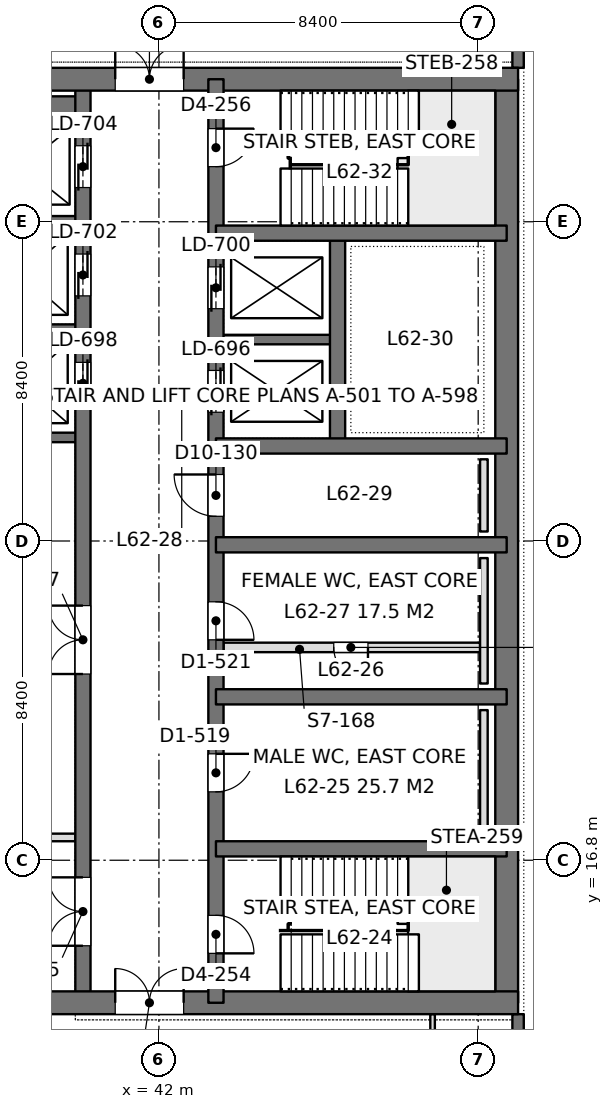
"""IFC4 building model, lengths in metres.
Left out: names, types, materials, properties, quantities, classifications, styles, units other than length and angle.
Written with IfcOpenShell. Run it as: python <this file> out.ifc"""

import sys

from ifc_helpers import new_model, si_unit, direction, frame, frame_2d, origin, place, context, subcontext, project, spatial, rectangle, extrude, element, fill, save


model = new_model("IFC4")
c1 = context("Model", 3, precision=1e-05, world=origin(), true_north=direction((0.0, 1.0)))
c2 = subcontext(c1, "Body", "Model", "MODEL_VIEW")
j1 = project(units=[si_unit("LENGTHUNIT", "METRE"), si_unit("PLANEANGLEUNIT", "RADIAN")], contexts=[c1])
p1 = place(None, origin())
s1 = spatial("IfcSite", under=j1, at=p1, CompositionType="ELEMENT")
p2 = place(p1, origin())
s2 = spatial("IfcBuilding", under=s1, at=p2, CompositionType="ELEMENT")
p3 = place(p2, frame((0.0, 0.0, 272.7)))
s3 = spatial("IfcBuildingStorey", under=s2, at=p3, CompositionType="ELEMENT", Elevation=272.7)
p4 = place(p3, frame((33.75, 13.05, 0.0), z_axis=(0.0, 0.0, 1.0), x_axis=(1.0, 0.0, 0.0)))
e1 = element("IfcWall", 1, at=p4, inside=s3, PredefinedType="SHEAR", context=c2, shape_type="SweptSolid", body=[
    extrude(rectangle(XDim=17.7, YDim=0.6, at=frame_2d((8.85, 0.0))), origin(), (0.0, 0.0, 1.0), 4.5),
])
p5 = place(p4, frame((7.1, 0.0, 0.0)))
e2 = element("IfcOpeningElement", 2, at=p5, cuts=e1, PredefinedType="OPENING", context=c2, shape_type="SweptSolid", body=[
    extrude(rectangle(XDim=1.8, YDim=2.4, at=frame_2d((0.9, 1.2))), frame((0.0, 0.31, 0.0), z_axis=(0.0, -1.0, 0.0), x_axis=(1.0, 0.0, 0.0)), (0.0, 0.0, 1.0), 0.62),
])
p6 = place(p3, frame((33.75, 37.35, 0.0), z_axis=(0.0, 0.0, 1.0), x_axis=(1.0, 0.0, 0.0)))
e3 = element("IfcWall", 3, at=p6, inside=s3, PredefinedType="SHEAR", context=c2, shape_type="SweptSolid", body=[
    extrude(rectangle(XDim=17.7, YDim=0.6, at=frame_2d((8.85, 0.0))), origin(), (0.0, 0.0, 1.0), 4.5),
])
p7 = place(p6, frame((7.1, 0.0, 0.0)))
e4 = element("IfcOpeningElement", 4, at=p7, cuts=e3, PredefinedType="OPENING", context=c2, shape_type="SweptSolid", body=[
    extrude(rectangle(XDim=1.8, YDim=2.4, at=frame_2d((0.9, 1.2))), frame((0.0, 0.31, 0.0), z_axis=(0.0, -1.0, 0.0), x_axis=(1.0, 0.0, 0.0)), (0.0, 0.0, 1.0), 0.62),
])
p8 = place(p3, frame((51.15, 13.05, 0.0), z_axis=(0.0, 0.0, 1.0), x_axis=(0.0, 1.0, 0.0)))
e5 = element("IfcWall", 5, at=p8, inside=s3, PredefinedType="SHEAR", context=c2, shape_type="SweptSolid", body=[
    extrude(rectangle(XDim=24.3, YDim=0.6, at=frame_2d((12.15, 0.0))), origin(), (0.0, 0.0, 1.0), 4.5),
])
p9 = place(p3, frame((43.5, 13.05, 0.0), z_axis=(0.0, 0.0, 1.0), x_axis=(0.0, 1.0, 0.0)))
e6 = element("IfcWall", 6, at=p9, inside=s3, PredefinedType="SHEAR", context=c2, shape_type="SweptSolid", body=[
    extrude(rectangle(XDim=24.3, YDim=0.4, at=frame_2d((12.15, 0.0))), origin(), (0.0, 0.0, 1.0), 4.5),
])
p10 = place(p9, frame((1.3, 0.0, 0.0)))
e7 = element("IfcOpeningElement", 7, at=p10, cuts=e6, PredefinedType="OPENING", context=c2, shape_type="SweptSolid", body=[
    extrude(rectangle(XDim=1.0, YDim=2.2, at=frame_2d((0.5, 1.1))), frame((0.0, 0.21, 0.0), z_axis=(0.0, -1.0, 0.0), x_axis=(1.0, 0.0, 0.0)), (0.0, 0.0, 1.0), 0.42),
])
p11 = place(p9, frame((22.0, 0.0, 0.0)))
e8 = element("IfcOpeningElement", 8, at=p11, cuts=e6, PredefinedType="OPENING", context=c2, shape_type="SweptSolid", body=[
    extrude(rectangle(XDim=1.0, YDim=2.2, at=frame_2d((0.5, 1.1))), frame((0.0, 0.21, 0.0), z_axis=(0.0, -1.0, 0.0), x_axis=(1.0, 0.0, 0.0)), (0.0, 0.0, 1.0), 0.42),
])
p12 = place(p9, frame((5.55, 0.0, 0.0)))
e9 = element("IfcOpeningElement", 9, at=p12, cuts=e6, PredefinedType="OPENING", context=c2, shape_type="SweptSolid", body=[
    extrude(rectangle(XDim=1.0, YDim=2.2, at=frame_2d((0.5, 1.1))), frame((0.0, 0.21, 0.0), z_axis=(0.0, -1.0, 0.0), x_axis=(1.0, 0.0, 0.0)), (0.0, 0.0, 1.0), 0.42),
])
p13 = place(p9, frame((9.55, 0.0, 0.0)))
e10 = element("IfcOpeningElement", 10, at=p13, cuts=e6, PredefinedType="OPENING", context=c2, shape_type="SweptSolid", body=[
    extrude(rectangle(XDim=1.0, YDim=2.2, at=frame_2d((0.5, 1.1))), frame((0.0, 0.21, 0.0), z_axis=(0.0, -1.0, 0.0), x_axis=(1.0, 0.0, 0.0)), (0.0, 0.0, 1.0), 0.42),
])
p14 = place(p9, frame((12.8, 0.0, 0.0)))
e11 = element("IfcOpeningElement", 11, at=p14, cuts=e6, PredefinedType="OPENING", context=c2, shape_type="SweptSolid", body=[
    extrude(rectangle(XDim=1.1, YDim=2.2, at=frame_2d((0.55, 1.1))), frame((0.0, 0.21, 0.0), z_axis=(0.0, -1.0, 0.0), x_axis=(1.0, 0.0, 0.0)), (0.0, 0.0, 1.0), 0.42),
])
p15 = place(p9, frame((15.538, 0.0, 0.0)))
e12 = element("IfcOpeningElement", 12, at=p15, cuts=e6, PredefinedType="OPENING", context=c2, shape_type="SweptSolid", body=[
    extrude(rectangle(XDim=1.1, YDim=2.2, at=frame_2d((0.55, 1.1))), frame((0.0, 0.21, 0.0), z_axis=(0.0, -1.0, 0.0), x_axis=(1.0, 0.0, 0.0)), (0.0, 0.0, 1.0), 0.42),
])
p16 = place(p9, frame((18.262, 0.0, 0.0)))
e13 = element("IfcOpeningElement", 13, at=p16, cuts=e6, PredefinedType="OPENING", context=c2, shape_type="SweptSolid", body=[
    extrude(rectangle(XDim=1.1, YDim=2.2, at=frame_2d((0.55, 1.1))), frame((0.0, 0.21, 0.0), z_axis=(0.0, -1.0, 0.0), x_axis=(1.0, 0.0, 0.0)), (0.0, 0.0, 1.0), 0.42),
])
p17 = place(p3, frame((40.0, 13.05, 0.0), z_axis=(0.0, 0.0, 1.0), x_axis=(0.0, 1.0, 0.0)))
e14 = element("IfcWall", 14, at=p17, inside=s3, PredefinedType="SHEAR", context=c2, shape_type="SweptSolid", body=[
    extrude(rectangle(XDim=24.3, YDim=0.4, at=frame_2d((12.15, 0.0))), origin(), (0.0, 0.0, 1.0), 4.5),
])
p18 = place(p17, frame((15.75, 0.0, 0.0)))
e15 = element("IfcOpeningElement", 15, at=p18, cuts=e14, PredefinedType="OPENING", context=c2, shape_type="SweptSolid", body=[
    extrude(rectangle(XDim=1.1, YDim=2.2, at=frame_2d((0.55, 1.1))), frame((0.0, 0.21, 0.0), z_axis=(0.0, -1.0, 0.0), x_axis=(1.0, 0.0, 0.0)), (0.0, 0.0, 1.0), 0.42),
])
p19 = place(p17, frame((18.6, 0.0, 0.0)))
e16 = element("IfcOpeningElement", 16, at=p19, cuts=e14, PredefinedType="OPENING", context=c2, shape_type="SweptSolid", body=[
    extrude(rectangle(XDim=1.1, YDim=2.2, at=frame_2d((0.55, 1.1))), frame((0.0, 0.21, 0.0), z_axis=(0.0, -1.0, 0.0), x_axis=(1.0, 0.0, 0.0)), (0.0, 0.0, 1.0), 0.42),
])
p20 = place(p17, frame((21.45, 0.0, 0.0)))
e17 = element("IfcOpeningElement", 17, at=p20, cuts=e14, PredefinedType="OPENING", context=c2, shape_type="SweptSolid", body=[
    extrude(rectangle(XDim=1.1, YDim=2.2, at=frame_2d((0.55, 1.1))), frame((0.0, 0.21, 0.0), z_axis=(0.0, -1.0, 0.0), x_axis=(1.0, 0.0, 0.0)), (0.0, 0.0, 1.0), 0.42),
])
p21 = place(p17, frame((8.65, 0.0, 0.0)))
e18 = element("IfcOpeningElement", 18, at=p21, cuts=e14, PredefinedType="OPENING", context=c2, shape_type="SweptSolid", body=[
    extrude(rectangle(XDim=1.8, YDim=2.4, at=frame_2d((0.9, 1.2))), frame((0.0, 0.21, 0.0), z_axis=(0.0, -1.0, 0.0), x_axis=(1.0, 0.0, 0.0)), (0.0, 0.0, 1.0), 0.42),
])
p22 = place(p17, frame((1.5, 0.0, 0.0)))
e19 = element("IfcOpeningElement", 19, at=p22, cuts=e14, PredefinedType="OPENING", context=c2, shape_type="SweptSolid", body=[
    extrude(rectangle(XDim=1.8, YDim=2.4, at=frame_2d((0.9, 1.2))), frame((0.0, 0.21, 0.0), z_axis=(0.0, -1.0, 0.0), x_axis=(1.0, 0.0, 0.0)), (0.0, 0.0, 1.0), 0.42),
])
for number, where, z_axis, x_axis in (
    (20, (51.15, 17.1, 0.0), (0.0, 0.0, 1.0), (-1.0, 0.0, 0.0)),
    (21, (51.15, 21.1, 0.0), (0.0, 0.0, 1.0), (-1.0, 0.0, 0.0)),
    (22, (51.15, 25.1, 0.0), (0.0, 0.0, 1.0), (-1.0, 0.0, 0.0)),
    (23, (51.15, 27.7, 0.0), (0.0, 0.0, 1.0), (-1.0, 0.0, 0.0)),
    (24, (51.15, 33.3, 0.0), (0.0, 0.0, 1.0), (-1.0, 0.0, 0.0)),
):
    element("IfcWall", number, at=place(p3, frame(where, z_axis=z_axis, x_axis=x_axis)), inside=s3, PredefinedType="SHEAR", context=c2, shape_type="SweptSolid", body=[
        extrude(rectangle(XDim=7.65, YDim=0.4, at=frame_2d((3.825, 0.0))), origin(), (0.0, 0.0, 1.0), 4.5),
    ])
p23 = place(p3, frame((46.7, 27.7, 0.0), z_axis=(0.0, 0.0, 1.0), x_axis=(0.0, 1.0, 0.0)))
e25 = element("IfcWall", 25, at=p23, inside=s3, PredefinedType="SHEAR", context=c2, shape_type="SweptSolid", body=[
    extrude(rectangle(XDim=5.6, YDim=0.4, at=frame_2d((2.8, 0.0))), origin(), (0.0, 0.0, 1.0), 4.5),
])
p24 = place(p3, frame((46.7, 30.5, 0.0), z_axis=(0.0, 0.0, 1.0), x_axis=(-1.0, 0.0, 0.0)))
e26 = element("IfcWall", 26, at=p24, inside=s3, PredefinedType="SHEAR", context=c2, shape_type="SweptSolid", body=[
    extrude(rectangle(XDim=3.2, YDim=0.25, at=frame_2d((1.6, 0.0))), origin(), (0.0, 0.0, 1.0), 4.5),
])
p25 = place(p3, frame((40.0, 27.925, 0.0), z_axis=(0.0, 0.0, 1.0), x_axis=(-1.0, 0.0, 0.0)))
e27 = element("IfcWall", 27, at=p25, inside=s3, PredefinedType="SHEAR", context=c2, shape_type="SweptSolid", body=[
    extrude(rectangle(XDim=5.95, YDim=0.25, at=frame_2d((2.975, 0.0))), origin(), (0.0, 0.0, 1.0), 4.5),
])
for number, where, z_axis, x_axis in (
    (28, (40.0, 30.775, 0.0), (0.0, 0.0, 1.0), (-1.0, 0.0, 0.0)),
    (29, (40.0, 33.625, 0.0), (0.0, 0.0, 1.0), (-1.0, 0.0, 0.0)),
):
    element("IfcWall", number, at=place(p3, frame(where, z_axis=z_axis, x_axis=x_axis)), inside=s3, PredefinedType="SHEAR", context=c2, shape_type="SweptSolid", body=[
        extrude(rectangle(XDim=3.2, YDim=0.25, at=frame_2d((1.6, 0.0))), origin(), (0.0, 0.0, 1.0), 4.5),
    ])
p26 = place(p3, frame((40.0, 36.625, 0.0), z_axis=(0.0, 0.0, 1.0), x_axis=(-1.0, 0.0, 0.0)))
e30 = element("IfcWall", 30, at=p26, inside=s3, PredefinedType="SHEAR", context=c2, shape_type="SweptSolid", body=[
    extrude(rectangle(XDim=3.2, YDim=0.55, at=frame_2d((1.6, 0.0))), origin(), (0.0, 0.0, 1.0), 4.5),
])
p27 = place(p3, frame((51.45, 42.0, 0.0), z_axis=(0.0, 0.0, 1.0), x_axis=(0.0, -1.0, 0.0)))
e31 = element("IfcWall", 31, at=p27, inside=s3, PredefinedType="SOLIDWALL", context=c2, shape_type="SweptSolid", body=[
    extrude(rectangle(XDim=4.35, YDim=0.3, at=frame_2d((2.175, 0.0))), origin(), (0.0, 0.0, 1.0), 4.35),
])
p28 = place(p27, frame((0.975, 0.0, 0.9)))
e32 = element("IfcOpeningElement", 32, at=p28, cuts=e31, PredefinedType="OPENING", context=c2, shape_type="SweptSolid", body=[
    extrude(rectangle(XDim=2.4, YDim=1.9, at=frame_2d((1.2, 0.95))), frame((0.0, 0.16, 0.0), z_axis=(0.0, -1.0, 0.0), x_axis=(1.0, 0.0, 0.0)), (0.0, 0.0, 1.0), 0.32),
])
p29 = place(p3, frame((51.45, 12.75, 0.0), z_axis=(0.0, 0.0, 1.0), x_axis=(0.0, -1.0, 0.0)))
e33 = element("IfcWall", 33, at=p29, inside=s3, PredefinedType="SOLIDWALL", context=c2, shape_type="SweptSolid", body=[
    extrude(rectangle(XDim=4.35, YDim=0.3, at=frame_2d((2.175, 0.0))), origin(), (0.0, 0.0, 1.0), 4.35),
])
p30 = place(p29, frame((0.975, 0.0, 0.9)))
e34 = element("IfcOpeningElement", 34, at=p30, cuts=e33, PredefinedType="OPENING", context=c2, shape_type="SweptSolid", body=[
    extrude(rectangle(XDim=2.4, YDim=1.9, at=frame_2d((1.2, 0.95))), frame((0.0, 0.16, 0.0), z_axis=(0.0, -1.0, 0.0), x_axis=(1.0, 0.0, 0.0)), (0.0, 0.0, 1.0), 0.32),
])
p31 = place(p3, frame((33.898, 17.4, 0.0), z_axis=(0.0, 0.0, 1.0), x_axis=(1.0, 0.0, 0.0)))
e35 = element("IfcWall", 35, at=p31, inside=s3, PredefinedType="PARTITIONING", context=c2, shape_type="SweptSolid", body=[
    extrude(rectangle(XDim=5.904, YDim=0.2, at=frame_2d((2.952, 0.0))), origin(), (0.0, 0.0, 1.0), 3.8),
])
for number, where, z_axis, x_axis in (
    (36, (49.2, 10.4, 0.0), (0.0, 0.0, 1.0), (0.0, 1.0, 0.0)),
    (37, (49.2, 37.648, 0.0), (0.0, 0.0, 1.0), (0.0, 1.0, 0.0)),
):
    element("IfcWall", number, at=place(p3, frame(where, z_axis=z_axis, x_axis=x_axis)), inside=s3, PredefinedType="PARTITIONING", context=c2, shape_type="SweptSolid", body=[
        extrude(rectangle(XDim=2.352, YDim=0.12, at=frame_2d((1.176, 0.0))), origin(), (0.0, 0.0, 1.0), 4.35),
    ])
p32 = place(p3, frame((43.7, 22.4, 0.0), z_axis=(0.0, 0.0, 1.0), x_axis=(1.0, 0.0, 0.0)))
e38 = element("IfcWall", 38, at=p32, inside=s3, PredefinedType="PARTITIONING", context=c2, shape_type="SweptSolid", body=[
    extrude(rectangle(XDim=6.75, YDim=0.25, at=frame_2d((3.375, 0.0))), origin(), (0.0, 0.0, 1.0), 4.3),
])
p33 = place(p32, frame((2.9, 0.0, 0.0)))
e39 = element("IfcOpeningElement", 39, at=p33, cuts=e38, PredefinedType="OPENING", context=c2, shape_type="SweptSolid", body=[
    extrude(rectangle(XDim=0.9, YDim=2.2, at=frame_2d((0.45, 1.1))), frame((0.0, 0.135, 0.0), z_axis=(0.0, -1.0, 0.0), x_axis=(1.0, 0.0, 0.0)), (0.0, 0.0, 1.0), 0.27),
])
for number, where, z_axis, x_axis in (
    (40, (50.55, 17.45, 0.0), (0.0, 0.0, 1.0), (0.0, 1.0, 0.0)),
    (41, (50.55, 21.45, 0.0), (0.0, 0.0, 1.0), (0.0, 1.0, 0.0)),
):
    element("IfcWall", number, at=place(p3, frame(where, z_axis=z_axis, x_axis=x_axis)), inside=s3, PredefinedType="PLUMBINGWALL", context=c2, shape_type="SweptSolid", body=[
        extrude(rectangle(XDim=3.3, YDim=0.2, at=frame_2d((1.65, 0.0))), origin(), (0.0, 0.0, 1.0), 1.2),
    ])
p34 = place(p3, frame((50.55, 25.45, 0.0), z_axis=(0.0, 0.0, 1.0), x_axis=(0.0, 1.0, 0.0)))
e42 = element("IfcWall", 42, at=p34, inside=s3, PredefinedType="PLUMBINGWALL", context=c2, shape_type="SweptSolid", body=[
    extrude(rectangle(XDim=1.9, YDim=0.2, at=frame_2d((0.95, 0.0))), origin(), (0.0, 0.0, 1.0), 1.2),
])
p35 = place(p5, origin())
e43 = element("IfcDoor", 43, at=p35, inside=s3, OperationType="DOUBLE_DOOR_SINGLE_SWING", PredefinedType="DOOR", context=c2, shape_type="SweptSolid", body=[
    extrude(rectangle(XDim=1.8, YDim=2.4, at=frame_2d((0.9, 1.2))), frame((0.0, 0.025, 0.0), z_axis=(0.0, -1.0, 0.0), x_axis=(1.0, 0.0, 0.0)), (0.0, 0.0, 1.0), 0.05),
])
fill(e2, e43)
p36 = place(p7, origin())
e44 = element("IfcDoor", 44, at=p36, inside=s3, OperationType="DOUBLE_DOOR_SINGLE_SWING", PredefinedType="DOOR", context=c2, shape_type="SweptSolid", body=[
    extrude(rectangle(XDim=1.8, YDim=2.4, at=frame_2d((0.9, 1.2))), frame((0.0, 0.025, 0.0), z_axis=(0.0, -1.0, 0.0), x_axis=(1.0, 0.0, 0.0)), (0.0, 0.0, 1.0), 0.05),
])
fill(e4, e44)
p37 = place(p10, frame((1.0, 0.0, 0.0), z_axis=(0.0, 0.0, 1.0), x_axis=(-1.0, 0.0, 0.0)))
e45 = element("IfcDoor", 45, at=p37, inside=s3, OperationType="SINGLE_SWING_RIGHT", PredefinedType="DOOR", context=c2, shape_type="SweptSolid", body=[
    extrude(rectangle(XDim=1.0, YDim=2.2, at=frame_2d((0.5, 1.1))), frame((0.0, 0.025, 0.0), z_axis=(0.0, -1.0, 0.0), x_axis=(1.0, 0.0, 0.0)), (0.0, 0.0, 1.0), 0.05),
])
fill(e7, e45)
p38 = place(p11, frame((1.0, 0.0, 0.0), z_axis=(0.0, 0.0, 1.0), x_axis=(-1.0, 0.0, 0.0)))
e46 = element("IfcDoor", 46, at=p38, inside=s3, OperationType="SINGLE_SWING_LEFT", PredefinedType="DOOR", context=c2, shape_type="SweptSolid", body=[
    extrude(rectangle(XDim=1.0, YDim=2.2, at=frame_2d((0.5, 1.1))), frame((0.0, 0.025, 0.0), z_axis=(0.0, -1.0, 0.0), x_axis=(1.0, 0.0, 0.0)), (0.0, 0.0, 1.0), 0.05),
])
fill(e8, e46)
p39 = place(p12, frame((1.0, 0.0, 0.0), z_axis=(0.0, 0.0, 1.0), x_axis=(-1.0, 0.0, 0.0)))
e47 = element("IfcDoor", 47, at=p39, inside=s3, OperationType="SINGLE_SWING_LEFT", PredefinedType="DOOR", context=c2, shape_type="SweptSolid", body=[
    extrude(rectangle(XDim=1.0, YDim=2.2, at=frame_2d((0.5, 1.1))), frame((0.0, 0.025, 0.0), z_axis=(0.0, -1.0, 0.0), x_axis=(1.0, 0.0, 0.0)), (0.0, 0.0, 1.0), 0.05),
])
fill(e9, e47)
p40 = place(p13, frame((1.0, 0.0, 0.0), z_axis=(0.0, 0.0, 1.0), x_axis=(-1.0, 0.0, 0.0)))
e48 = element("IfcDoor", 48, at=p40, inside=s3, OperationType="SINGLE_SWING_RIGHT", PredefinedType="DOOR", context=c2, shape_type="SweptSolid", body=[
    extrude(rectangle(XDim=1.0, YDim=2.2, at=frame_2d((0.5, 1.1))), frame((0.0, 0.025, 0.0), z_axis=(0.0, -1.0, 0.0), x_axis=(1.0, 0.0, 0.0)), (0.0, 0.0, 1.0), 0.05),
])
fill(e10, e48)
p41 = place(p14, origin())
e49 = element("IfcDoor", 49, at=p41, inside=s3, OperationType="SINGLE_SWING_RIGHT", PredefinedType="DOOR", context=c2, shape_type="SweptSolid", body=[
    extrude(rectangle(XDim=1.1, YDim=2.2, at=frame_2d((0.55, 1.1))), frame((0.0, 0.025, 0.0), z_axis=(0.0, -1.0, 0.0), x_axis=(1.0, 0.0, 0.0)), (0.0, 0.0, 1.0), 0.05),
])
fill(e11, e49)
p42 = place(p18, origin())
e50 = element("IfcDoor", 50, at=p42, inside=s3, OperationType="DOUBLE_DOOR_SLIDING", PredefinedType="DOOR", context=c2, shape_type="SweptSolid", body=[
    extrude(rectangle(XDim=1.1, YDim=2.2, at=frame_2d((0.55, 1.1))), frame((0.0, 0.025, 0.0), z_axis=(0.0, -1.0, 0.0), x_axis=(1.0, 0.0, 0.0)), (0.0, 0.0, 1.0), 0.05),
])
fill(e15, e50)
p43 = place(p19, origin())
e51 = element("IfcDoor", 51, at=p43, inside=s3, OperationType="DOUBLE_DOOR_SLIDING", PredefinedType="DOOR", context=c2, shape_type="SweptSolid", body=[
    extrude(rectangle(XDim=1.1, YDim=2.2, at=frame_2d((0.55, 1.1))), frame((0.0, 0.025, 0.0), z_axis=(0.0, -1.0, 0.0), x_axis=(1.0, 0.0, 0.0)), (0.0, 0.0, 1.0), 0.05),
])
fill(e16, e51)
p44 = place(p20, origin())
e52 = element("IfcDoor", 52, at=p44, inside=s3, OperationType="DOUBLE_DOOR_SLIDING", PredefinedType="DOOR", context=c2, shape_type="SweptSolid", body=[
    extrude(rectangle(XDim=1.1, YDim=2.2, at=frame_2d((0.55, 1.1))), frame((0.0, 0.025, 0.0), z_axis=(0.0, -1.0, 0.0), x_axis=(1.0, 0.0, 0.0)), (0.0, 0.0, 1.0), 0.05),
])
fill(e17, e52)
p45 = place(p15, origin())
e53 = element("IfcDoor", 53, at=p45, inside=s3, OperationType="DOUBLE_DOOR_SLIDING", PredefinedType="DOOR", context=c2, shape_type="SweptSolid", body=[
    extrude(rectangle(XDim=1.1, YDim=2.2, at=frame_2d((0.55, 1.1))), frame((0.0, 0.025, 0.0), z_axis=(0.0, -1.0, 0.0), x_axis=(1.0, 0.0, 0.0)), (0.0, 0.0, 1.0), 0.05),
])
fill(e12, e53)
p46 = place(p16, origin())
e54 = element("IfcDoor", 54, at=p46, inside=s3, OperationType="DOUBLE_DOOR_SLIDING", PredefinedType="DOOR", context=c2, shape_type="SweptSolid", body=[
    extrude(rectangle(XDim=1.1, YDim=2.2, at=frame_2d((0.55, 1.1))), frame((0.0, 0.025, 0.0), z_axis=(0.0, -1.0, 0.0), x_axis=(1.0, 0.0, 0.0)), (0.0, 0.0, 1.0), 0.05),
])
fill(e13, e54)
p47 = place(p21, origin())
e55 = element("IfcDoor", 55, at=p47, inside=s3, OperationType="DOUBLE_DOOR_SINGLE_SWING", PredefinedType="DOOR", context=c2, shape_type="SweptSolid", body=[
    extrude(rectangle(XDim=1.8, YDim=2.4, at=frame_2d((0.9, 1.2))), frame((0.0, 0.025, 0.0), z_axis=(0.0, -1.0, 0.0), x_axis=(1.0, 0.0, 0.0)), (0.0, 0.0, 1.0), 0.05),
])
fill(e18, e55)
p48 = place(p22, origin())
e56 = element("IfcDoor", 56, at=p48, inside=s3, OperationType="DOUBLE_DOOR_SINGLE_SWING", PredefinedType="DOOR", context=c2, shape_type="SweptSolid", body=[
    extrude(rectangle(XDim=1.8, YDim=2.4, at=frame_2d((0.9, 1.2))), frame((0.0, 0.025, 0.0), z_axis=(0.0, -1.0, 0.0), x_axis=(1.0, 0.0, 0.0)), (0.0, 0.0, 1.0), 0.05),
])
fill(e19, e56)
p49 = place(p33, frame((0.9, 0.0, 0.0), z_axis=(0.0, 0.0, 1.0), x_axis=(-1.0, 0.0, 0.0)))
e57 = element("IfcDoor", 57, at=p49, inside=s3, OperationType="SINGLE_SWING_LEFT", PredefinedType="DOOR", context=c2, shape_type="SweptSolid", body=[
    extrude(rectangle(XDim=0.9, YDim=2.2, at=frame_2d((0.45, 1.1))), frame((0.0, 0.025, 0.0), z_axis=(0.0, -1.0, 0.0), x_axis=(1.0, 0.0, 0.0)), (0.0, 0.0, 1.0), 0.05),
])
fill(e39, e57)
save(model, sys.argv[1])
